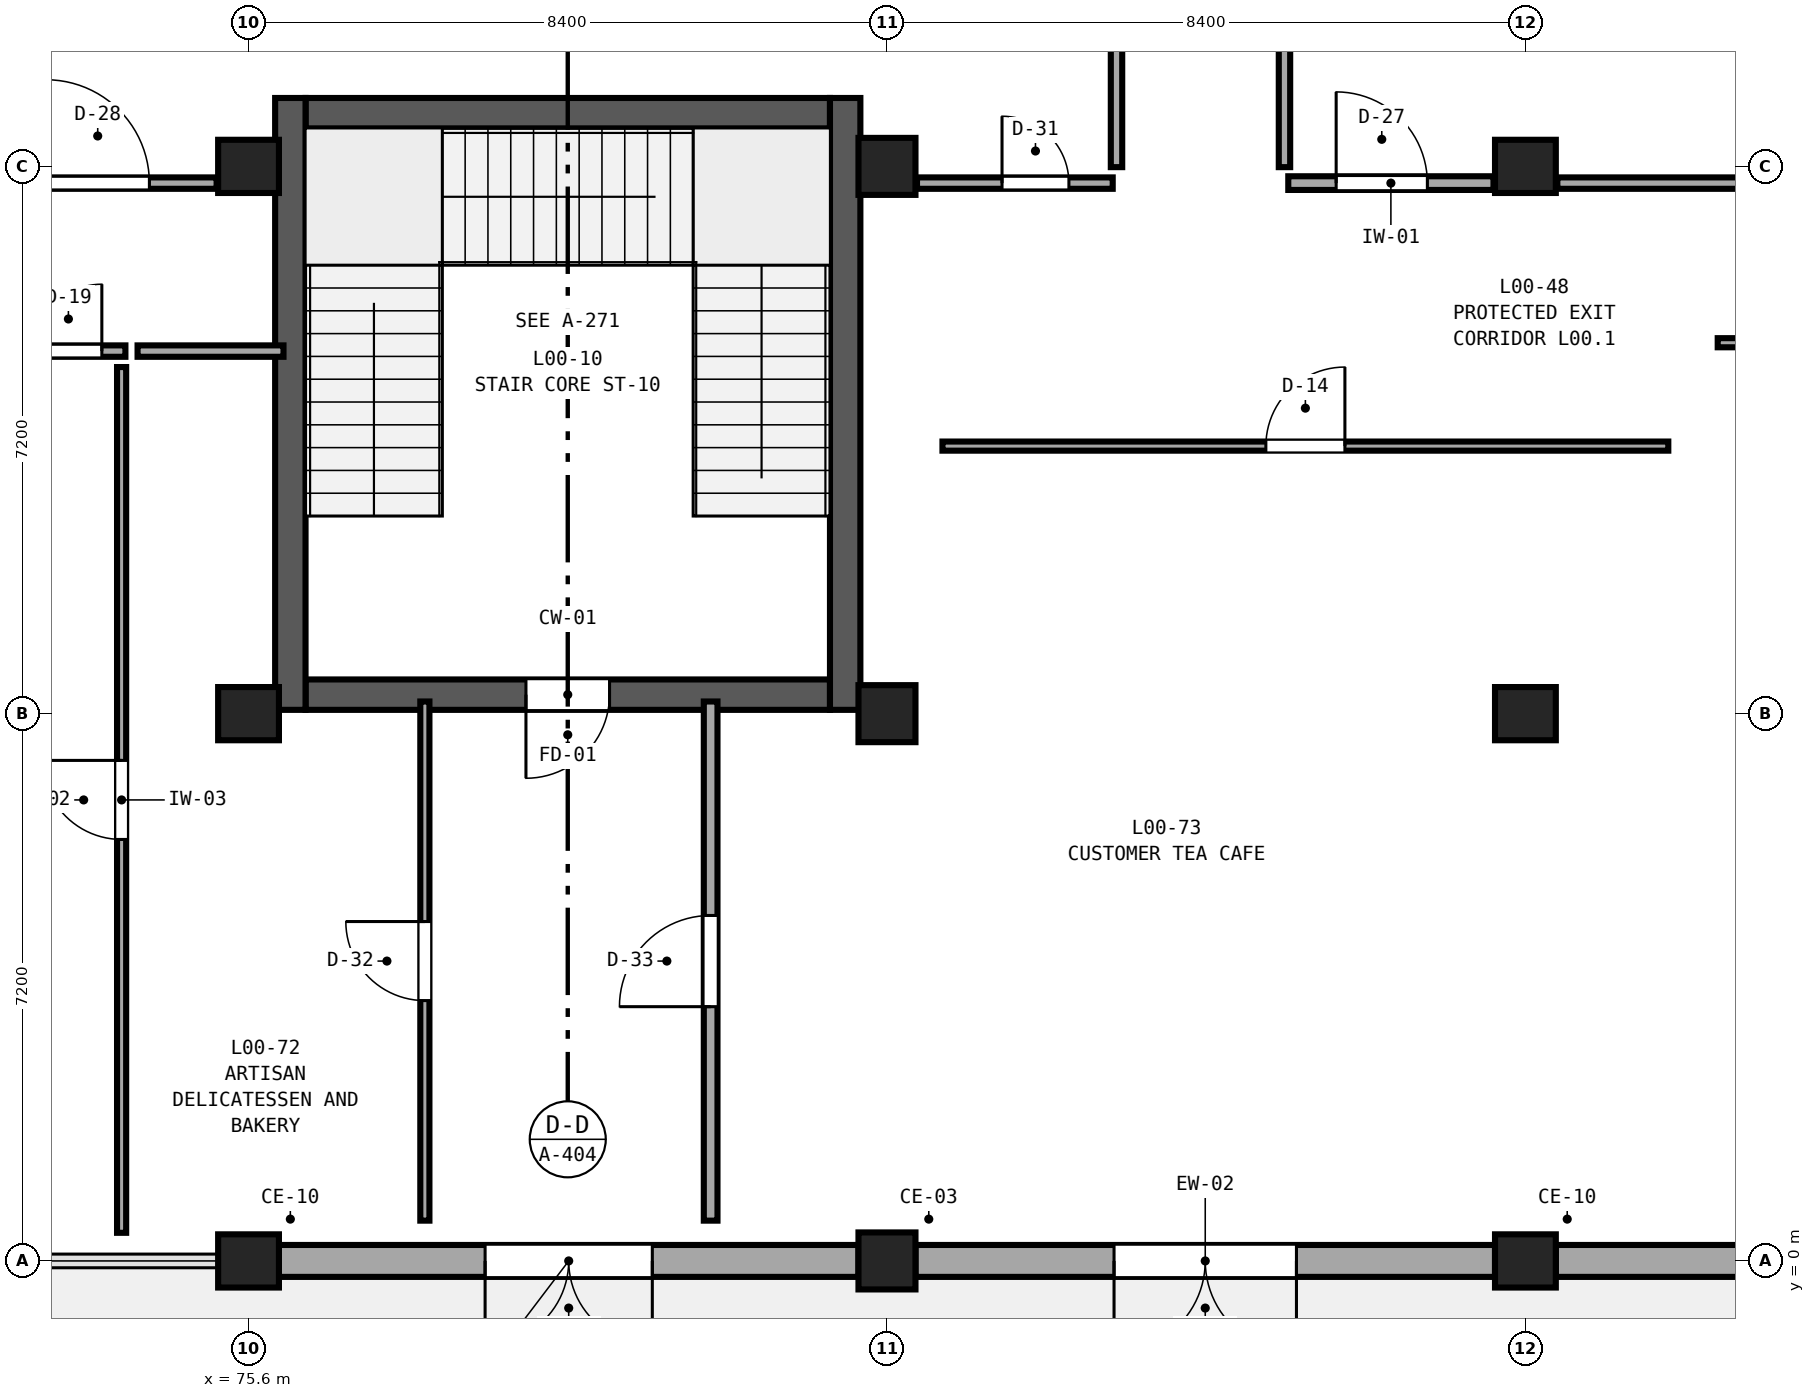
"""IFC4 building model, lengths in metres.
Left out: names, types, materials, properties, quantities, classifications, styles, units other than length and angle.
Written with IfcOpenShell. Run it as: python <this file> out.ifc"""

import sys

from ifc_helpers import new_model, si_unit, direction, frame, frame_2d, origin, origin_2d, place, context, subcontext, project, spatial, rectangle, extrude, element, fill, save


model = new_model("IFC4")
c1 = context("Model", 3, precision=1e-05, world=origin(), true_north=direction((0.0, 1.0)))
c2 = subcontext(c1, "Body", "Model", "MODEL_VIEW")
j1 = project(units=[si_unit("LENGTHUNIT", "METRE"), si_unit("PLANEANGLEUNIT", "RADIAN")], contexts=[c1])
p1 = place(None, origin())
s1 = spatial("IfcSite", under=j1, at=p1, CompositionType="ELEMENT")
p2 = place(p1, origin())
s2 = spatial("IfcBuilding", under=s1, at=p2, CompositionType="ELEMENT")
p3 = place(p2, origin())
s3 = spatial("IfcBuildingStorey", under=s2, at=p3, CompositionType="ELEMENT", Elevation=0.0)
for number, where, z_axis, x_axis in (
    (1, (75.6, 0.0, 0.0), (0.0, 0.0, 1.0), (1.0, 0.0, 0.0)),
    (2, (75.6, 7.2, 0.0), (0.0, 0.0, 1.0), (1.0, 0.0, 0.0)),
    (3, (75.6, 14.4, 0.0), (0.0, 0.0, 1.0), (1.0, 0.0, 0.0)),
):
    element("IfcColumn", number, at=place(p3, frame(where, z_axis=z_axis, x_axis=x_axis)), inside=s3, PredefinedType="COLUMN", context=c2, shape_type="SweptSolid", body=[
        extrude(rectangle(XDim=0.8, YDim=0.7, at=origin_2d()), origin(), (0.0, 0.0, 1.0), 5.4),
    ])
for number, where, z_axis, x_axis in (
    (4, (84.0, 0.0, 0.0), (0.0, 0.0, 1.0), (1.0, 0.0, 0.0)),
    (5, (84.0, 7.2, 0.0), (0.0, 0.0, 1.0), (1.0, 0.0, 0.0)),
    (6, (84.0, 14.4, 0.0), (0.0, 0.0, 1.0), (1.0, 0.0, 0.0)),
):
    element("IfcColumn", number, at=place(p3, frame(where, z_axis=z_axis, x_axis=x_axis)), inside=s3, PredefinedType="COLUMN", context=c2, shape_type="SweptSolid", body=[
        extrude(rectangle(XDim=0.75, YDim=0.75, at=origin_2d()), origin(), (0.0, 0.0, 1.0), 5.4),
    ])
for number, where, z_axis, x_axis in (
    (7, (92.4, 0.0, 0.0), (0.0, 0.0, 1.0), (1.0, 0.0, 0.0)),
    (8, (92.4, 7.2, 0.0), (0.0, 0.0, 1.0), (1.0, 0.0, 0.0)),
    (9, (92.4, 14.4, 0.0), (0.0, 0.0, 1.0), (1.0, 0.0, 0.0)),
):
    element("IfcColumn", number, at=place(p3, frame(where, z_axis=z_axis, x_axis=x_axis)), inside=s3, PredefinedType="COLUMN", context=c2, shape_type="SweptSolid", body=[
        extrude(rectangle(XDim=0.8, YDim=0.7, at=origin_2d()), origin(), (0.0, 0.0, 1.0), 5.4),
    ])
p4 = place(p3, frame((83.625, 0.0, 0.0), z_axis=(0.0, 0.0, 1.0), x_axis=(-1.0, 0.0, 0.0)))
e10 = element("IfcWall", 10, at=p4, inside=s3, PredefinedType="SOLIDWALL", context=c2, shape_type="SweptSolid", body=[
    extrude(rectangle(XDim=7.625, YDim=0.42, at=frame_2d((3.812, 0.0))), origin(), (0.0, 0.0, 1.0), 4.53),
])
p5 = place(p4, frame((2.712, 0.0, 0.0)))
e11 = element("IfcOpeningElement", 11, at=p5, cuts=e10, PredefinedType="OPENING", context=c2, shape_type="SweptSolid", body=[
    extrude(rectangle(XDim=2.2, YDim=2.5, at=frame_2d((1.1, 1.25))), frame((0.0, 0.23, 0.0), z_axis=(0.0, -1.0, 0.0), x_axis=(1.0, 0.0, 0.0)), (0.0, 0.0, 1.0), 0.46),
])
p6 = place(p3, frame((92.0, 0.0, 0.0), z_axis=(0.0, 0.0, 1.0), x_axis=(-1.0, 0.0, 0.0)))
e12 = element("IfcWall", 12, at=p6, inside=s3, PredefinedType="SOLIDWALL", context=c2, shape_type="SweptSolid", body=[
    extrude(rectangle(XDim=7.625, YDim=0.42, at=frame_2d((3.812, 0.0))), origin(), (0.0, 0.0, 1.0), 4.53),
])
p7 = place(p6, frame((2.613, 0.0, 0.0)))
e13 = element("IfcOpeningElement", 13, at=p7, cuts=e12, PredefinedType="OPENING", context=c2, shape_type="SweptSolid", body=[
    extrude(rectangle(XDim=2.4, YDim=2.6, at=frame_2d((1.2, 1.3))), frame((0.0, 0.23, 0.0), z_axis=(0.0, -1.0, 0.0), x_axis=(1.0, 0.0, 0.0)), (0.0, 0.0, 1.0), 0.46),
])
p8 = place(p3, frame((100.425, 0.0, 0.0), z_axis=(0.0, 0.0, 1.0), x_axis=(-1.0, 0.0, 0.0)))
e14 = element("IfcWall", 14, at=p8, inside=s3, PredefinedType="SOLIDWALL", context=c2, shape_type="SweptSolid", body=[
    extrude(rectangle(XDim=7.625, YDim=0.42, at=frame_2d((3.812, 0.0))), origin(), (0.0, 0.0, 1.0), 4.53),
])
p9 = place(p8, frame((2.762, 0.0, 0.0)))
e15 = element("IfcOpeningElement", 15, at=p9, cuts=e14, PredefinedType="OPENING", context=c2, shape_type="SweptSolid", body=[
    extrude(rectangle(XDim=2.1, YDim=2.45, at=frame_2d((1.05, 1.225))), frame((0.0, 0.23, 0.0), z_axis=(0.0, -1.0, 0.0), x_axis=(1.0, 0.0, 0.0)), (0.0, 0.0, 1.0), 0.46),
])
p10 = place(p3, frame((83.25, 7.45, 0.0), z_axis=(0.0, 0.0, 1.0), x_axis=(-1.0, 0.0, 0.0)))
e16 = element("IfcWall", 16, at=p10, inside=s3, PredefinedType="SHEAR", context=c2, shape_type="SweptSolid", body=[
    extrude(rectangle(XDim=6.9, YDim=0.4, at=frame_2d((3.45, 0.0))), origin(), (0.0, 0.0, 1.0), 5.4),
])
p11 = place(p10, frame((2.9, 0.0, 0.0)))
e17 = element("IfcOpeningElement", 17, at=p11, cuts=e16, PredefinedType="OPENING", context=c2, shape_type="SweptSolid", body=[
    extrude(rectangle(XDim=1.1, YDim=2.2, at=frame_2d((0.55, 1.1))), frame((0.0, 0.22, 0.0), z_axis=(0.0, -1.0, 0.0), x_axis=(1.0, 0.0, 0.0)), (0.0, 0.0, 1.0), 0.44),
])
p12 = place(p3, frame((76.35, 15.1, 0.0), z_axis=(0.0, 0.0, 1.0), x_axis=(1.0, 0.0, 0.0)))
e18 = element("IfcWall", 18, at=p12, inside=s3, PredefinedType="SHEAR", context=c2, shape_type="SweptSolid", body=[
    extrude(rectangle(XDim=6.9, YDim=0.4, at=frame_2d((3.45, 0.0))), origin(), (0.0, 0.0, 1.0), 5.4),
])
for number, where, z_axis, x_axis in (
    (19, (76.15, 15.3, 0.0), (0.0, 0.0, 1.0), (0.0, -1.0, 0.0)),
    (20, (83.45, 7.25, 0.0), (0.0, 0.0, 1.0), (0.0, 1.0, 0.0)),
):
    element("IfcWall", number, at=place(p3, frame(where, z_axis=z_axis, x_axis=x_axis)), inside=s3, PredefinedType="SHEAR", context=c2, shape_type="SweptSolid", body=[
        extrude(rectangle(XDim=8.05, YDim=0.4, at=frame_2d((4.025, 0.0))), origin(), (0.0, 0.0, 1.0), 5.4),
    ])
p13 = place(p3, frame((89.28, 14.18, 0.0), z_axis=(0.0, 0.0, 1.0), x_axis=(1.0, 0.0, 0.0)))
e21 = element("IfcWall", 21, at=p13, inside=s3, PredefinedType="PARTITIONING", context=c2, shape_type="SweptSolid", body=[
    extrude(rectangle(XDim=2.7, YDim=0.18, at=frame_2d((1.35, 0.0))), origin(), (0.0, 0.0, 1.0), 4.58),
])
p14 = place(p13, frame((0.63, 0.0, 0.0)))
e22 = element("IfcOpeningElement", 22, at=p14, cuts=e21, PredefinedType="OPENING", context=c2, shape_type="SweptSolid", body=[
    extrude(rectangle(XDim=1.2, YDim=2.37, at=frame_2d((0.6, 1.185))), frame((0.0, 0.11, 0.0), z_axis=(0.0, -1.0, 0.0), x_axis=(1.0, 0.0, 0.0)), (0.0, 0.0, 1.0), 0.22),
])
p15 = place(p3, frame((92.82, 14.18, 0.0), z_axis=(0.0, 0.0, 1.0), x_axis=(1.0, 0.0, 0.0)))
e23 = element("IfcWall", 23, at=p15, inside=s3, PredefinedType="PARTITIONING", context=c2, shape_type="SweptSolid", body=[
    extrude(rectangle(XDim=7.585, YDim=0.15, at=frame_2d((3.792, 0.0))), origin(), (0.0, 0.0, 1.0), 4.58),
])
p16 = place(p15, frame((3.113, 0.0, 0.0)))
e24 = element("IfcOpeningElement", 24, at=p16, cuts=e23, PredefinedType="OPENING", context=c2, shape_type="SweptSolid", body=[
    extrude(rectangle(XDim=1.36, YDim=2.37, at=frame_2d((0.68, 1.185))), frame((0.0, 0.095, 0.0), z_axis=(0.0, -1.0, 0.0), x_axis=(1.0, 0.0, 0.0)), (0.0, 0.0, 1.0), 0.19),
])
p17 = place(p3, frame((73.93, 0.37, 0.0), z_axis=(0.0, 0.0, 1.0), x_axis=(0.0, 1.0, 0.0)))
e25 = element("IfcWall", 25, at=p17, inside=s3, PredefinedType="PARTITIONING", context=c2, shape_type="SweptSolid", body=[
    extrude(rectangle(XDim=11.39, YDim=0.12, at=frame_2d((5.695, 0.0))), origin(), (0.0, 0.0, 1.0), 5.08),
])
p18 = place(p17, frame((5.175, 0.0, 0.0)))
e26 = element("IfcOpeningElement", 26, at=p18, cuts=e25, PredefinedType="OPENING", context=c2, shape_type="SweptSolid", body=[
    extrude(rectangle(XDim=1.04, YDim=2.05, at=frame_2d((0.52, 1.025))), frame((0.0, 0.08, 0.0), z_axis=(0.0, -1.0, 0.0), x_axis=(1.0, 0.0, 0.0)), (0.0, 0.0, 1.0), 0.16),
])
p19 = place(p3, frame((87.02, 14.39, 0.0), z_axis=(0.0, 0.0, 1.0), x_axis=(0.0, 1.0, 0.0)))
e27 = element("IfcWall", 27, at=p19, inside=s3, PredefinedType="PARTITIONING", context=c2, shape_type="SweptSolid", body=[
    extrude(rectangle(XDim=10.47, YDim=0.15, at=frame_2d((5.235, 0.0))), origin(), (0.0, 0.0, 1.0), 5.08),
])
p20 = place(p19, frame((4.795, 0.0, 0.0)))
e28 = element("IfcOpeningElement", 28, at=p20, cuts=e27, PredefinedType="OPENING", context=c2, shape_type="SweptSolid", body=[
    extrude(rectangle(XDim=0.88, YDim=2.13, at=frame_2d((0.44, 1.065))), frame((0.0, 0.095, 0.0), z_axis=(0.0, -1.0, 0.0), x_axis=(1.0, 0.0, 0.0)), (0.0, 0.0, 1.0), 0.19),
])
p21 = place(p3, frame((89.23, 14.39, 0.0), z_axis=(0.0, 0.0, 1.0), x_axis=(0.0, 1.0, 0.0)))
e29 = element("IfcWall", 29, at=p21, inside=s3, PredefinedType="PARTITIONING", context=c2, shape_type="SweptSolid", body=[
    extrude(rectangle(XDim=10.47, YDim=0.15, at=frame_2d((5.235, 0.0))), origin(), (0.0, 0.0, 1.0), 5.08),
])
p22 = place(p21, frame((4.555, 0.0, 0.0)))
e30 = element("IfcOpeningElement", 30, at=p22, cuts=e29, PredefinedType="OPENING", context=c2, shape_type="SweptSolid", body=[
    extrude(rectangle(XDim=1.36, YDim=2.13, at=frame_2d((0.68, 1.065))), frame((0.0, 0.095, 0.0), z_axis=(0.0, -1.0, 0.0), x_axis=(1.0, 0.0, 0.0)), (0.0, 0.0, 1.0), 0.19),
])
p23 = place(p3, frame((84.73, 10.72, 0.0), z_axis=(0.0, 0.0, 1.0), x_axis=(1.0, 0.0, 0.0)))
e31 = element("IfcWall", 31, at=p23, inside=s3, PredefinedType="PARTITIONING", context=c2, shape_type="SweptSolid", body=[
    extrude(rectangle(XDim=9.55, YDim=0.12, at=frame_2d((4.775, 0.0))), origin(), (0.0, 0.0, 1.0), 5.08),
])
p24 = place(p23, frame((4.255, 0.0, 0.0)))
e32 = element("IfcOpeningElement", 32, at=p24, cuts=e31, PredefinedType="OPENING", context=c2, shape_type="SweptSolid", body=[
    extrude(rectangle(XDim=1.04, YDim=2.21, at=frame_2d((0.52, 1.105))), frame((0.0, 0.08, 0.0), z_axis=(0.0, -1.0, 0.0), x_axis=(1.0, 0.0, 0.0)), (0.0, 0.0, 1.0), 0.16),
])
p25 = place(p3, frame((77.92, 0.53, 0.0), z_axis=(0.0, 0.0, 1.0), x_axis=(0.0, 1.0, 0.0)))
e33 = element("IfcWall", 33, at=p25, inside=s3, PredefinedType="PARTITIONING", context=c2, shape_type="SweptSolid", body=[
    extrude(rectangle(XDim=6.83, YDim=0.12, at=frame_2d((3.415, 0.0))), origin(), (0.0, 0.0, 1.0), 5.08),
])
p26 = place(p25, frame((2.895, 0.0, 0.0)))
e34 = element("IfcOpeningElement", 34, at=p26, cuts=e33, PredefinedType="OPENING", context=c2, shape_type="SweptSolid", body=[
    extrude(rectangle(XDim=1.04, YDim=2.45, at=frame_2d((0.52, 1.225))), frame((0.0, 0.08, 0.0), z_axis=(0.0, -1.0, 0.0), x_axis=(1.0, 0.0, 0.0)), (0.0, 0.0, 1.0), 0.16),
])
p27 = place(p3, frame((81.68, 0.53, 0.0), z_axis=(0.0, 0.0, 1.0), x_axis=(0.0, 1.0, 0.0)))
e35 = element("IfcWall", 35, at=p27, inside=s3, PredefinedType="PARTITIONING", context=c2, shape_type="SweptSolid", body=[
    extrude(rectangle(XDim=6.83, YDim=0.18, at=frame_2d((3.415, 0.0))), origin(), (0.0, 0.0, 1.0), 5.08),
])
p28 = place(p27, frame((2.815, 0.0, 0.0)))
e36 = element("IfcOpeningElement", 36, at=p28, cuts=e35, PredefinedType="OPENING", context=c2, shape_type="SweptSolid", body=[
    extrude(rectangle(XDim=1.2, YDim=2.45, at=frame_2d((0.6, 1.225))), frame((0.0, 0.11, 0.0), z_axis=(0.0, -1.0, 0.0), x_axis=(1.0, 0.0, 0.0)), (0.0, 0.0, 1.0), 0.22),
])
p29 = place(p3, frame((94.93, 12.08, 0.0), z_axis=(0.0, 0.0, 1.0), x_axis=(1.0, 0.0, 0.0)))
e37 = element("IfcWall", 37, at=p29, inside=s3, PredefinedType="PARTITIONING", context=c2, shape_type="SweptSolid", body=[
    extrude(rectangle(XDim=6.33, YDim=0.12, at=frame_2d((3.165, 0.0))), origin(), (0.0, 0.0, 1.0), 5.08),
])
p30 = place(p29, frame((2.645, 0.0, 0.0)))
e38 = element("IfcOpeningElement", 38, at=p30, cuts=e37, PredefinedType="OPENING", context=c2, shape_type="SweptSolid", body=[
    extrude(rectangle(XDim=1.04, YDim=2.05, at=frame_2d((0.52, 1.025))), frame((0.0, 0.08, 0.0), z_axis=(0.0, -1.0, 0.0), x_axis=(1.0, 0.0, 0.0)), (0.0, 0.0, 1.0), 0.16),
])
p31 = place(p3, frame((72.48, 14.18, 0.0), z_axis=(0.0, 0.0, 1.0), x_axis=(1.0, 0.0, 0.0)))
e39 = element("IfcWall", 39, at=p31, inside=s3, PredefinedType="PARTITIONING", context=c2, shape_type="SweptSolid", body=[
    extrude(rectangle(XDim=2.7, YDim=0.15, at=frame_2d((1.35, 0.0))), origin(), (0.0, 0.0, 1.0), 4.58),
])
p32 = place(p31, frame((0.456, 0.0, 0.0)))
e40 = element("IfcOpeningElement", 40, at=p32, cuts=e39, PredefinedType="OPENING", context=c2, shape_type="SweptSolid", body=[
    extrude(rectangle(XDim=1.36, YDim=2.37, at=frame_2d((0.68, 1.185))), frame((0.0, 0.095, 0.0), z_axis=(0.0, -1.0, 0.0), x_axis=(1.0, 0.0, 0.0)), (0.0, 0.0, 1.0), 0.19),
])
p33 = place(p3, frame((84.395, 14.18, 0.0), z_axis=(0.0, 0.0, 1.0), x_axis=(1.0, 0.0, 0.0)))
e41 = element("IfcWall", 41, at=p33, inside=s3, PredefinedType="PARTITIONING", context=c2, shape_type="SweptSolid", body=[
    extrude(rectangle(XDim=2.575, YDim=0.15, at=frame_2d((1.288, 0.0))), origin(), (0.0, 0.0, 1.0), 4.58),
])
p34 = place(p33, frame((1.119, 0.0, 0.0)))
e42 = element("IfcOpeningElement", 42, at=p34, cuts=e41, PredefinedType="OPENING", context=c2, shape_type="SweptSolid", body=[
    extrude(rectangle(XDim=0.88, YDim=2.45, at=frame_2d((0.44, 1.225))), frame((0.0, 0.095, 0.0), z_axis=(0.0, -1.0, 0.0), x_axis=(1.0, 0.0, 0.0)), (0.0, 0.0, 1.0), 0.19),
])
p35 = place(p3, frame((74.14, 11.97, 0.0), z_axis=(0.0, 0.0, 1.0), x_axis=(1.0, 0.0, 0.0)))
e43 = element("IfcWall", 43, at=p35, inside=s3, PredefinedType="PARTITIONING", context=c2, shape_type="SweptSolid", body=[
    extrude(rectangle(XDim=1.92, YDim=0.15, at=frame_2d((0.96, 0.0))), origin(), (0.0, 0.0, 1.0), 5.08),
])
p36 = place(p3, frame((72.48, 11.97, 0.0), z_axis=(0.0, 0.0, 1.0), x_axis=(1.0, 0.0, 0.0)))
e44 = element("IfcWall", 44, at=p36, inside=s3, PredefinedType="PARTITIONING", context=c2, shape_type="SweptSolid", body=[
    extrude(rectangle(XDim=1.5, YDim=0.15, at=frame_2d((0.75, 0.0))), origin(), (0.0, 0.0, 1.0), 5.08),
])
p37 = place(p36, frame((0.31, 0.0, 0.0)))
e45 = element("IfcOpeningElement", 45, at=p37, cuts=e44, PredefinedType="OPENING", context=c2, shape_type="SweptSolid", body=[
    extrude(rectangle(XDim=0.88, YDim=2.29, at=frame_2d((0.44, 1.145))), frame((0.0, 0.095, 0.0), z_axis=(0.0, -1.0, 0.0), x_axis=(1.0, 0.0, 0.0)), (0.0, 0.0, 1.0), 0.19),
])
p38 = place(p5, origin())
e46 = element("IfcDoor", 46, at=p38, inside=s3, OperationType="DOUBLE_DOOR_SINGLE_SWING", PredefinedType="DOOR", context=c2, shape_type="SweptSolid", body=[
    extrude(rectangle(XDim=2.2, YDim=2.5, at=frame_2d((1.1, 1.25))), frame((0.0, 0.025, 0.0), z_axis=(0.0, -1.0, 0.0), x_axis=(1.0, 0.0, 0.0)), (0.0, 0.0, 1.0), 0.05),
])
fill(e11, e46)
p39 = place(p7, origin())
e47 = element("IfcDoor", 47, at=p39, inside=s3, OperationType="DOUBLE_DOOR_SINGLE_SWING", PredefinedType="DOOR", context=c2, shape_type="SweptSolid", body=[
    extrude(rectangle(XDim=2.4, YDim=2.6, at=frame_2d((1.2, 1.3))), frame((0.0, 0.025, 0.0), z_axis=(0.0, -1.0, 0.0), x_axis=(1.0, 0.0, 0.0)), (0.0, 0.0, 1.0), 0.05),
])
fill(e13, e47)
p40 = place(p11, origin())
e48 = element("IfcDoor", 48, at=p40, inside=s3, OperationType="SINGLE_SWING_RIGHT", PredefinedType="DOOR", context=c2, shape_type="SweptSolid", body=[
    extrude(rectangle(XDim=1.1, YDim=2.2, at=frame_2d((0.55, 1.1))), frame((0.0, 0.025, 0.0), z_axis=(0.0, -1.0, 0.0), x_axis=(1.0, 0.0, 0.0)), (0.0, 0.0, 1.0), 0.05),
])
fill(e17, e48)
p41 = place(p14, origin())
e49 = element("IfcDoor", 49, at=p41, inside=s3, OperationType="SINGLE_SWING_LEFT", PredefinedType="DOOR", context=c2, shape_type="SweptSolid", body=[
    extrude(rectangle(XDim=1.2, YDim=2.37, at=frame_2d((0.6, 1.185))), frame((0.0, 0.025, 0.0), z_axis=(0.0, -1.0, 0.0), x_axis=(1.0, 0.0, 0.0)), (0.0, 0.0, 1.0), 0.05),
])
fill(e22, e49)
p42 = place(p18, origin())
e50 = element("IfcDoor", 50, at=p42, inside=s3, OperationType="SINGLE_SWING_RIGHT", PredefinedType="DOOR", context=c2, shape_type="SweptSolid", body=[
    extrude(rectangle(XDim=1.04, YDim=2.05, at=frame_2d((0.52, 1.025))), frame((0.0, 0.025, 0.0), z_axis=(0.0, -1.0, 0.0), x_axis=(1.0, 0.0, 0.0)), (0.0, 0.0, 1.0), 0.05),
])
fill(e26, e50)
p43 = place(p24, frame((1.04, 0.0, 0.0), z_axis=(0.0, 0.0, 1.0), x_axis=(-1.0, 0.0, 0.0)))
e51 = element("IfcDoor", 51, at=p43, inside=s3, OperationType="SINGLE_SWING_RIGHT", PredefinedType="DOOR", context=c2, shape_type="SweptSolid", body=[
    extrude(rectangle(XDim=1.04, YDim=2.21, at=frame_2d((0.52, 1.105))), frame((0.0, 0.025, 0.0), z_axis=(0.0, -1.0, 0.0), x_axis=(1.0, 0.0, 0.0)), (0.0, 0.0, 1.0), 0.05),
])
fill(e32, e51)
p44 = place(p26, origin())
e52 = element("IfcDoor", 52, at=p44, inside=s3, OperationType="SINGLE_SWING_RIGHT", PredefinedType="DOOR", context=c2, shape_type="SweptSolid", body=[
    extrude(rectangle(XDim=1.04, YDim=2.45, at=frame_2d((0.52, 1.225))), frame((0.0, 0.025, 0.0), z_axis=(0.0, -1.0, 0.0), x_axis=(1.0, 0.0, 0.0)), (0.0, 0.0, 1.0), 0.05),
])
fill(e34, e52)
p45 = place(p28, frame((1.2, 0.0, 0.0), z_axis=(0.0, 0.0, 1.0), x_axis=(-1.0, 0.0, 0.0)))
e53 = element("IfcDoor", 53, at=p45, inside=s3, OperationType="SINGLE_SWING_LEFT", PredefinedType="DOOR", context=c2, shape_type="SweptSolid", body=[
    extrude(rectangle(XDim=1.2, YDim=2.45, at=frame_2d((0.6, 1.225))), frame((0.0, 0.025, 0.0), z_axis=(0.0, -1.0, 0.0), x_axis=(1.0, 0.0, 0.0)), (0.0, 0.0, 1.0), 0.05),
])
fill(e36, e53)
p46 = place(p32, origin())
e54 = element("IfcDoor", 54, at=p46, inside=s3, OperationType="SINGLE_SWING_LEFT", PredefinedType="DOOR", context=c2, shape_type="SweptSolid", body=[
    extrude(rectangle(XDim=1.36, YDim=2.37, at=frame_2d((0.68, 1.185))), frame((0.0, 0.025, 0.0), z_axis=(0.0, -1.0, 0.0), x_axis=(1.0, 0.0, 0.0)), (0.0, 0.0, 1.0), 0.05),
])
fill(e40, e54)
p47 = place(p34, origin())
e55 = element("IfcDoor", 55, at=p47, inside=s3, OperationType="SINGLE_SWING_LEFT", PredefinedType="DOOR", context=c2, shape_type="SweptSolid", body=[
    extrude(rectangle(XDim=0.88, YDim=2.45, at=frame_2d((0.44, 1.225))), frame((0.0, 0.025, 0.0), z_axis=(0.0, -1.0, 0.0), x_axis=(1.0, 0.0, 0.0)), (0.0, 0.0, 1.0), 0.05),
])
fill(e42, e55)
p48 = place(p37, frame((0.88, 0.0, 0.0), z_axis=(0.0, 0.0, 1.0), x_axis=(-1.0, 0.0, 0.0)))
e56 = element("IfcDoor", 56, at=p48, inside=s3, OperationType="SINGLE_SWING_RIGHT", PredefinedType="DOOR", context=c2, shape_type="SweptSolid", body=[
    extrude(rectangle(XDim=0.88, YDim=2.29, at=frame_2d((0.44, 1.145))), frame((0.0, 0.025, 0.0), z_axis=(0.0, -1.0, 0.0), x_axis=(1.0, 0.0, 0.0)), (0.0, 0.0, 1.0), 0.05),
])
fill(e45, e56)
save(model, sys.argv[1])
